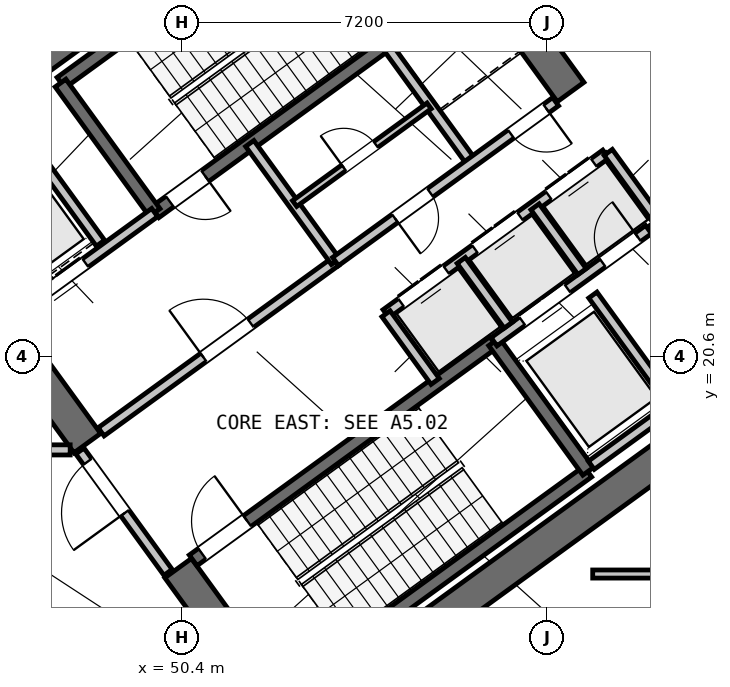
"""IFC4 building model, lengths in metres.
Left out: names, types, materials, properties, quantities, classifications, styles, units other than length and angle.
Written with IfcOpenShell. Run it as: python <this file> out.ifc"""

import sys

from ifc_helpers import new_model, si_unit, direction, frame, frame_2d, origin, place, context, subcontext, project, spatial, rectangle, extrude, source, transform, mapped, element, fill, save


model = new_model("IFC4")
c1 = context("Model", 3, precision=1e-05, world=origin(), true_north=direction((0.0, 1.0)))
c2 = subcontext(c1, "Body", "Model", "MODEL_VIEW")
j1 = project(units=[si_unit("LENGTHUNIT", "METRE"), si_unit("PLANEANGLEUNIT", "RADIAN")], contexts=[c1])
p1 = place(None, origin())
s1 = spatial("IfcSite", under=j1, at=p1, CompositionType="ELEMENT")
p2 = place(p1, origin())
s2 = spatial("IfcBuilding", under=s1, at=p2, CompositionType="ELEMENT")
p3 = place(p2, origin())
s3 = spatial("IfcBuildingStorey", under=s2, at=p3, CompositionType="ELEMENT", Elevation=0.0)
p4 = place(p3, frame((52.318, 13.11, 0.0), z_axis=(0.0, 0.0, 1.0), x_axis=(0.809019445368, 0.587781878776, 0.0)))
e1 = element("IfcWall", 1, at=p4, inside=s3, PredefinedType="SHEAR", context=c2, shape_type="SweptSolid", body=[
    extrude(rectangle(XDim=12.44, YDim=0.65, at=frame_2d((6.22, 0.0))), origin(), (0.0, 0.0, 1.0), 5.05),
])
p5 = place(p3, frame((44.325, 24.113, 0.0), z_axis=(0.0, 0.0, 1.0), x_axis=(0.809012664862, 0.58779121131, 0.0)))
e2 = element("IfcWall", 2, at=p5, inside=s3, PredefinedType="SHEAR", context=c2, shape_type="SweptSolid", body=[
    extrude(rectangle(XDim=12.44, YDim=0.65, at=frame_2d((6.22, 0.0))), origin(), (0.0, 0.0, 1.0), 5.05),
])
p6 = place(p3, frame((52.39, 13.564, 0.0), z_axis=(0.0, 0.0, 1.0), x_axis=(-0.58779688989, 0.809008539037, 0.0)))
e3 = element("IfcWall", 3, at=p6, inside=s3, PredefinedType="SHEAR", context=c2, shape_type="SweptSolid", body=[
    extrude(rectangle(XDim=3.525, YDim=0.65, at=frame_2d((1.763, 0.0))), origin(), (0.0, 0.0, 1.0), 5.05),
])
p7 = place(p3, frame((48.526, 18.884, 0.0), z_axis=(0.0, 0.0, 1.0), x_axis=(-0.58777996584, 0.809020835181, 0.0)))
e4 = element("IfcWall", 4, at=p7, inside=s3, PredefinedType="SHEAR", context=c2, shape_type="SweptSolid", body=[
    extrude(rectangle(XDim=6.375, YDim=0.65, at=frame_2d((3.188, 0.0))), origin(), (0.0, 0.0, 1.0), 5.05),
])
p8 = place(p3, frame((61.929, 20.494, 0.0), z_axis=(0.0, 0.0, 1.0), x_axis=(-0.58782982593, 0.808984607855, 0.0)))
e5 = element("IfcWall", 5, at=p8, inside=s3, PredefinedType="SHEAR", context=c2, shape_type="SweptSolid", body=[
    extrude(rectangle(XDim=3.525, YDim=0.65, at=frame_2d((1.762, 0.0))), origin(), (0.0, 0.0, 1.0), 5.05),
])
p9 = place(p3, frame((58.064, 25.813, 0.0), z_axis=(0.0, 0.0, 1.0), x_axis=(-0.58777996584, 0.809020835181, 0.0)))
e6 = element("IfcWall", 6, at=p9, inside=s3, PredefinedType="SHEAR", context=c2, shape_type="SweptSolid", body=[
    extrude(rectangle(XDim=6.375, YDim=0.65, at=frame_2d((3.188, 0.0))), origin(), (0.0, 0.0, 1.0), 5.05),
])
p10 = place(p3, frame((48.006, 25.996, 0.0), z_axis=(0.0, 0.0, 1.0), x_axis=(0.80901903764, 0.587782439969, 0.0)))
e7 = element("IfcWall", 7, at=p10, inside=s3, PredefinedType="SHEAR", context=c2, shape_type="SweptSolid", body=[
    extrude(rectangle(XDim=7.46, YDim=0.26, at=frame_2d((3.73, 0.0))), origin(), (0.0, 0.0, 1.0), 5.05),
])
p11 = place(p3, frame((49.863, 23.44, 0.0), z_axis=(0.0, 0.0, 1.0), x_axis=(0.809003474932, 0.587803859759, 0.0)))
e8 = element("IfcWall", 8, at=p11, inside=s3, PredefinedType="SHEAR", context=c2, shape_type="SweptSolid", body=[
    extrude(rectangle(XDim=7.46, YDim=0.26, at=frame_2d((3.73, 0.0))), origin(), (0.0, 0.0, 1.0), 5.05),
])
p12 = place(p11, frame((0.36, 0.0, 0.0)))
e9 = element("IfcOpeningElement", 9, at=p12, cuts=e8, PredefinedType="OPENING", context=c2, shape_type="SweptSolid", body=[
    extrude(rectangle(XDim=0.86, YDim=2.05, at=frame_2d((0.43, 1.025))), frame((0.0, 0.14, 0.0), z_axis=(0.0, -1.0, 0.0), x_axis=(1.0, 0.0, 0.0)), (0.0, 0.0, 1.0), 0.28),
])
p13 = place(p3, frame((49.855, 23.434, 0.0), z_axis=(0.0, 0.0, 1.0), x_axis=(-0.58776738483, 0.809029975545, 0.0)))
e10 = element("IfcWall", 10, at=p13, inside=s3, PredefinedType="SHEAR", context=c2, shape_type="SweptSolid", body=[
    extrude(rectangle(XDim=3.16, YDim=0.26, at=frame_2d((1.58, 0.0))), origin(), (0.0, 0.0, 1.0), 5.05),
])
p14 = place(p3, frame((52.472, 14.013, 0.0), z_axis=(0.0, 0.0, 1.0), x_axis=(0.809028366311, 0.587769599847, 0.0)))
e11 = element("IfcWall", 11, at=p14, inside=s3, PredefinedType="SHEAR", context=c2, shape_type="SweptSolid", body=[
    extrude(rectangle(XDim=7.33, YDim=0.26, at=frame_2d((3.665, 0.0))), origin(), (0.0, 0.0, 1.0), 5.05),
])
p15 = place(p3, frame((50.615, 16.57, 0.0), z_axis=(0.0, 0.0, 1.0), x_axis=(0.809028366311, 0.587769599847, 0.0)))
e12 = element("IfcWall", 12, at=p15, inside=s3, PredefinedType="SHEAR", context=c2, shape_type="SweptSolid", body=[
    extrude(rectangle(XDim=7.33, YDim=0.26, at=frame_2d((3.665, 0.0))), origin(), (0.0, 0.0, 1.0), 5.05),
])
p16 = place(p15, frame((0.22, 0.0, 0.0)))
e13 = element("IfcOpeningElement", 13, at=p16, cuts=e12, PredefinedType="OPENING", context=c2, shape_type="SweptSolid", body=[
    extrude(rectangle(XDim=1.1, YDim=2.1, at=frame_2d((0.55, 1.05))), frame((0.0, 0.14, 0.0), z_axis=(0.0, -1.0, 0.0), x_axis=(1.0, 0.0, 0.0)), (0.0, 0.0, 1.0), 0.28),
])
p17 = place(p3, frame((58.41, 18.327, 0.0), z_axis=(0.0, 0.0, 1.0), x_axis=(-0.58776738483, 0.809029975545, 0.0)))
e14 = element("IfcWall", 14, at=p17, inside=s3, PredefinedType="SHEAR", context=c2, shape_type="SweptSolid", body=[
    extrude(rectangle(XDim=3.16, YDim=0.26, at=frame_2d((1.58, 0.0))), origin(), (0.0, 0.0, 1.0), 5.05),
])
p18 = place(p3, frame((47.106, 21.437, 0.0), z_axis=(0.0, 0.0, 1.0), x_axis=(0.809012514015, 0.58779141893, 0.0)))
e15 = element("IfcWall", 15, at=p18, inside=s3, PredefinedType="STANDARD", context=c2, shape_type="SweptSolid", body=[
    extrude(rectangle(XDim=3.398, YDim=0.2, at=frame_2d((1.699, 0.0))), origin(), (0.0, 0.0, 1.0), 5.04),
])
p19 = place(p18, frame((0.408, 0.0, 0.0)))
e16 = element("IfcOpeningElement", 16, at=p19, cuts=e15, PredefinedType="OPENING", context=c2, shape_type="SweptSolid", body=[
    extrude(rectangle(XDim=1.3, YDim=2.2, at=frame_2d((0.65, 1.1))), frame((0.0, 0.11, 0.0), z_axis=(0.0, -1.0, 0.0), x_axis=(1.0, 0.0, 0.0)), (0.0, 0.0, 1.0), 0.22),
])
p20 = place(p3, frame((48.799, 19.107, 0.0), z_axis=(0.0, 0.0, 1.0), x_axis=(0.809012959416, 0.587790805897, 0.0)))
e17 = element("IfcWall", 17, at=p20, inside=s3, PredefinedType="STANDARD", context=c2, shape_type="SweptSolid", body=[
    extrude(rectangle(XDim=5.718, YDim=0.2, at=frame_2d((2.859, 0.0))), origin(), (0.0, 0.0, 1.0), 5.04),
])
p21 = place(p20, frame((2.498, 0.0, 0.0)))
e18 = element("IfcOpeningElement", 18, at=p21, cuts=e17, PredefinedType="OPENING", context=c2, shape_type="SweptSolid", body=[
    extrude(rectangle(XDim=1.15, YDim=2.1, at=frame_2d((0.575, 1.05))), frame((0.0, 0.11, 0.0), z_axis=(0.0, -1.0, 0.0), x_axis=(1.0, 0.0, 0.0)), (0.0, 0.0, 1.0), 0.22),
])
p22 = place(p3, frame((56.553, 20.884, 0.0), z_axis=(0.0, 0.0, 1.0), x_axis=(0.809035789462, 0.587759382205, 0.0)))
e19 = element("IfcWall", 19, at=p22, inside=s3, PredefinedType="STANDARD", context=c2, shape_type="SweptSolid", body=[
    extrude(rectangle(XDim=3.768, YDim=0.2, at=frame_2d((1.884, 0.0))), origin(), (0.0, 0.0, 1.0), 5.04),
])
p23 = place(p22, frame((0.69, 0.0, 0.0)))
e20 = element("IfcOpeningElement", 20, at=p23, cuts=e19, PredefinedType="OPENING", context=c2, shape_type="SweptSolid", body=[
    extrude(rectangle(XDim=1.1, YDim=2.15, at=frame_2d((0.55, 1.075))), frame((0.0, 0.11, 0.0), z_axis=(0.0, -1.0, 0.0), x_axis=(1.0, 0.0, 0.0)), (0.0, 0.0, 1.0), 0.22),
])
p24 = place(p22, frame((2.65, 0.0, 0.0)))
e21 = element("IfcOpeningElement", 21, at=p24, cuts=e19, PredefinedType="OPENING", context=c2, shape_type="SweptSolid", body=[
    extrude(rectangle(XDim=0.86, YDim=2.05, at=frame_2d((0.43, 1.025))), frame((0.0, 0.11, 0.0), z_axis=(0.0, -1.0, 0.0), x_axis=(1.0, 0.0, 0.0)), (0.0, 0.0, 1.0), 0.22),
])
p25 = place(p3, frame((54.421, 21.436, 0.0), z_axis=(0.0, 0.0, 1.0), x_axis=(0.809013710463, 0.587789772183, 0.0)))
e22 = element("IfcWall", 22, at=p25, inside=s3, PredefinedType="STANDARD", context=c2, shape_type="SweptSolid", body=[
    extrude(rectangle(XDim=5.36, YDim=0.2, at=frame_2d((2.68, 0.0))), origin(), (0.0, 0.0, 1.0), 5.04),
])
p26 = place(p25, frame((0.37, 0.0, 0.0)))
e23 = element("IfcOpeningElement", 23, at=p26, cuts=e22, PredefinedType="OPENING", context=c2, shape_type="SweptSolid", body=[
    extrude(rectangle(XDim=1.1, YDim=2.15, at=frame_2d((0.55, 1.075))), frame((0.0, 0.11, 0.0), z_axis=(0.0, -1.0, 0.0), x_axis=(1.0, 0.0, 0.0)), (0.0, 0.0, 1.0), 0.22),
])
p27 = place(p25, frame((2.17, 0.0, 0.0)))
e24 = element("IfcOpeningElement", 24, at=p27, cuts=e22, PredefinedType="OPENING", context=c2, shape_type="SweptSolid", body=[
    extrude(rectangle(XDim=1.1, YDim=2.15, at=frame_2d((0.55, 1.075))), frame((0.0, 0.11, 0.0), z_axis=(0.0, -1.0, 0.0), x_axis=(1.0, 0.0, 0.0)), (0.0, 0.0, 1.0), 0.22),
])
p28 = place(p25, frame((3.97, 0.0, 0.0)))
e25 = element("IfcOpeningElement", 25, at=p28, cuts=e22, PredefinedType="OPENING", context=c2, shape_type="SweptSolid", body=[
    extrude(rectangle(XDim=1.1, YDim=2.15, at=frame_2d((0.55, 1.075))), frame((0.0, 0.11, 0.0), z_axis=(0.0, -1.0, 0.0), x_axis=(1.0, 0.0, 0.0)), (0.0, 0.0, 1.0), 0.22),
])
p29 = place(p3, frame((55.391, 20.102, 0.0), z_axis=(0.0, 0.0, 1.0), x_axis=(-0.58778447739, 0.809017557374, 0.0)))
e26 = element("IfcWall", 26, at=p29, inside=s3, PredefinedType="STANDARD", context=c2, shape_type="SweptSolid", body=[
    extrude(rectangle(XDim=1.65, YDim=0.2, at=frame_2d((0.825, 0.0))), origin(), (0.0, 0.0, 1.0), 5.04),
])
p30 = place(p3, frame((48.786, 22.83, 0.0), z_axis=(0.0, 0.0, 1.0), x_axis=(-0.587783856777, 0.809018008275, 0.0)))
e27 = element("IfcWall", 27, at=p30, inside=s3, PredefinedType="STANDARD", context=c2, shape_type="SweptSolid", body=[
    extrude(rectangle(XDim=2.92, YDim=0.2, at=frame_2d((1.46, 0.0))), origin(), (0.0, 0.0, 1.0), 5.04),
])
p31 = place(p3, frame((56.834, 21.212, 0.0), z_axis=(0.0, 0.0, 1.0), x_axis=(-0.58776738483, 0.809029975545, 0.0)))
e28 = element("IfcWall", 28, at=p31, inside=s3, PredefinedType="STANDARD", context=c2, shape_type="SweptSolid", body=[
    extrude(rectangle(XDim=1.58, YDim=0.2, at=frame_2d((0.79, 0.0))), origin(), (0.0, 0.0, 1.0), 5.04),
])
p32 = place(p3, frame((58.29, 22.27, 0.0), z_axis=(0.0, 0.0, 1.0), x_axis=(-0.587840865826, 0.808976585857, 0.0)))
e29 = element("IfcWall", 29, at=p32, inside=s3, PredefinedType="STANDARD", context=c2, shape_type="SweptSolid", body=[
    extrude(rectangle(XDim=1.58, YDim=0.2, at=frame_2d((0.79, 0.0))), origin(), (0.0, 0.0, 1.0), 5.04),
])
p33 = place(p3, frame((59.758, 23.312, 0.0), z_axis=(0.0, 0.0, 1.0), x_axis=(-0.587875962906, 0.808951081486, 0.0)))
e30 = element("IfcWall", 30, at=p33, inside=s3, PredefinedType="STANDARD", context=c2, shape_type="SweptSolid", body=[
    extrude(rectangle(XDim=1.62, YDim=0.2, at=frame_2d((0.81, 0.0))), origin(), (0.0, 0.0, 1.0), 5.04),
])
p34 = place(p3, frame((60.067, 19.655, 0.0), z_axis=(0.0, 0.0, 1.0), x_axis=(-0.587800520745, 0.809005900975, 0.0)))
e31 = element("IfcWall", 31, at=p34, inside=s3, PredefinedType="STANDARD", context=c2, shape_type="SweptSolid", body=[
    extrude(rectangle(XDim=2.66, YDim=0.2, at=frame_2d((1.33, 0.0))), origin(), (0.0, 0.0, 1.0), 5.04),
])
p35 = place(p3, frame((58.472, 18.447, 0.0), z_axis=(0.0, 0.0, 1.0), x_axis=(0.809022487728, 0.587777691266, 0.0)))
e32 = element("IfcWall", 32, at=p35, inside=s3, PredefinedType="STANDARD", context=c2, shape_type="SweptSolid", body=[
    extrude(rectangle(XDim=3.648, YDim=0.2, at=frame_2d((1.824, 0.0))), origin(), (0.0, 0.0, 1.0), 5.04),
])
p36 = place(p3, frame((53.425, 22.468, 0.0), z_axis=(0.0, 0.0, 1.0), x_axis=(-0.5877230039, 0.809062216821, 0.0)))
e33 = element("IfcWall", 33, at=p36, inside=s3, PredefinedType="STANDARD", context=c2, shape_type="SweptSolid", body=[
    extrude(rectangle(XDim=2.88, YDim=0.2, at=frame_2d((1.44, 0.0))), origin(), (0.0, 0.0, 1.0), 5.04),
])
p37 = place(p3, frame((56.111, 24.419, 0.0), z_axis=(0.0, 0.0, 1.0), x_axis=(-0.58777848983, 0.809021907548, 0.0)))
e34 = element("IfcWall", 34, at=p37, inside=s3, PredefinedType="STANDARD", context=c2, shape_type="SweptSolid", body=[
    extrude(rectangle(XDim=2.88, YDim=0.2, at=frame_2d((1.44, 0.0))), origin(), (0.0, 0.0, 1.0), 5.04),
])
p38 = place(p3, frame((53.425, 22.468, 0.0), z_axis=(0.0, 0.0, 1.0), x_axis=(0.80902705128, 0.587771409902, 0.0)))
e35 = element("IfcWall", 35, at=p38, inside=s3, PredefinedType="STANDARD", context=c2, shape_type="SweptSolid", body=[
    extrude(rectangle(XDim=5.368, YDim=0.2, at=frame_2d((2.684, 0.0))), origin(), (0.0, 0.0, 1.0), 5.04),
])
p39 = place(p38, frame((4.28, 0.0, 0.0)))
e36 = element("IfcOpeningElement", 36, at=p39, cuts=e35, PredefinedType="OPENING", context=c2, shape_type="SweptSolid", body=[
    extrude(rectangle(XDim=0.86, YDim=2.05, at=frame_2d((0.43, 1.025))), frame((0.0, 0.11, 0.0), z_axis=(0.0, -1.0, 0.0), x_axis=(1.0, 0.0, 0.0)), (0.0, 0.0, 1.0), 0.22),
])
p40 = place(p38, frame((1.45, 0.0, 0.0)))
e37 = element("IfcOpeningElement", 37, at=p40, cuts=e35, PredefinedType="OPENING", context=c2, shape_type="SweptSolid", body=[
    extrude(rectangle(XDim=0.86, YDim=2.05, at=frame_2d((0.43, 1.025))), frame((0.0, 0.11, 0.0), z_axis=(0.0, -1.0, 0.0), x_axis=(1.0, 0.0, 0.0)), (0.0, 0.0, 1.0), 0.22),
])
p41 = place(p3, frame((52.618, 23.612, 0.0), z_axis=(0.0, 0.0, 1.0), x_axis=(0.809009587469, 0.587795446889, 0.0)))
e38 = element("IfcWall", 38, at=p41, inside=s3, PredefinedType="PLUMBINGWALL", context=c2, shape_type="SweptSolid", body=[
    extrude(rectangle(XDim=3.28, YDim=0.14, at=frame_2d((1.64, 0.0))), origin(), (0.0, 0.0, 1.0), 5.04),
])
p42 = place(p41, frame((1.2, 0.0, 0.0)))
e39 = element("IfcOpeningElement", 39, at=p42, cuts=e38, PredefinedType="OPENING", context=c2, shape_type="SweptSolid", body=[
    extrude(rectangle(XDim=0.78, YDim=2.05, at=frame_2d((0.39, 1.025))), frame((0.0, 0.08, 0.0), z_axis=(0.0, -1.0, 0.0), x_axis=(1.0, 0.0, 0.0)), (0.0, 0.0, 1.0), 0.16),
])
p43 = place(p3, frame((46.85, 18.75, 0.0), z_axis=(0.0, 0.0, 1.0), x_axis=(1.0, 0.0, 0.0)))
e40 = element("IfcWall", 40, at=p43, inside=s3, PredefinedType="STANDARD", context=c2, shape_type="SweptSolid", body=[
    extrude(rectangle(XDim=1.338, YDim=0.2, at=frame_2d((0.669, 0.0))), origin(), (0.0, 0.0, 1.0), 5.04),
])
p44 = place(p3, frame((50.119, 16.333, 0.0), z_axis=(0.0, 0.0, 1.0), x_axis=(-0.587749856981, 0.809042709391, 0.0)))
e41 = element("IfcWall", 41, at=p44, inside=s3, PredefinedType="STANDARD", context=c2, shape_type="SweptSolid", body=[
    extrude(rectangle(XDim=2.96, YDim=0.2, at=frame_2d((1.48, 0.0))), origin(), (0.0, 0.0, 1.0), 5.04),
])
p45 = place(p44, frame((1.45, 0.0, 0.0)))
e42 = element("IfcOpeningElement", 42, at=p45, cuts=e41, PredefinedType="OPENING", context=c2, shape_type="SweptSolid", body=[
    extrude(rectangle(XDim=1.25, YDim=2.15, at=frame_2d((0.625, 1.075))), frame((0.0, 0.11, 0.0), z_axis=(0.0, -1.0, 0.0), x_axis=(1.0, 0.0, 0.0)), (0.0, 0.0, 1.0), 0.22),
])
p46 = place(p3, frame((58.5, 16.3, 0.0), z_axis=(0.0, 0.0, 1.0), x_axis=(1.0, 0.0, 0.0)))
e43 = element("IfcWall", 43, at=p46, inside=s3, PredefinedType="PARTITIONING", context=c2, shape_type="SweptSolid", body=[
    extrude(rectangle(XDim=11.9, YDim=0.16, at=frame_2d((5.95, 0.0))), origin(), (0.0, 0.0, 1.0), 5.04),
])
p47 = place(p46, frame((1.4, 0.0, 0.0)))
e44 = element("IfcOpeningElement", 44, at=p47, cuts=e43, PredefinedType="OPENING", context=c2, shape_type="SweptSolid", body=[
    extrude(rectangle(XDim=1.7, YDim=2.2, at=frame_2d((0.85, 1.1))), frame((0.0, 0.09, 0.0), z_axis=(0.0, -1.0, 0.0), x_axis=(1.0, 0.0, 0.0)), (0.0, 0.0, 1.0), 0.18),
])
m1 = source(origin(), c2, "Body", "SweptSolid", [
    extrude(rectangle(XDim=0.86, YDim=2.05, at=frame_2d((0.43, 1.025))), frame((0.0, 0.025, 0.0), z_axis=(0.0, -1.0, 0.0), x_axis=(1.0, 0.0, 0.0)), (0.0, 0.0, 1.0), 0.05),
])
p48 = place(p12, frame((0.86, 0.0, 0.0), z_axis=(0.0, 0.0, 1.0), x_axis=(-1.0, 0.0, 0.0)))
e45 = element("IfcDoor", 45, at=p48, inside=s3, OperationType="SINGLE_SWING_LEFT", PredefinedType="DOOR", context=c2, shape_type="MappedRepresentation", body=[
    mapped(m1, transform((0.0, 0.0, 0.0), scale=1.0)),
])
fill(e9, e45)
m2 = source(origin(), c2, "Body", "SweptSolid", [
    extrude(rectangle(XDim=1.1, YDim=2.1, at=frame_2d((0.55, 1.05))), frame((0.0, 0.025, 0.0), z_axis=(0.0, -1.0, 0.0), x_axis=(1.0, 0.0, 0.0)), (0.0, 0.0, 1.0), 0.05),
])
p49 = place(p16, origin())
e46 = element("IfcDoor", 46, at=p49, inside=s3, OperationType="SINGLE_SWING_RIGHT", PredefinedType="DOOR", context=c2, shape_type="MappedRepresentation", body=[
    mapped(m2, transform((0.0, 0.0, 0.0), scale=1.0)),
])
fill(e13, e46)
m3 = source(origin(), c2, "Body", "SweptSolid", [
    extrude(rectangle(XDim=1.15, YDim=2.1, at=frame_2d((0.575, 1.05))), frame((0.0, 0.025, 0.0), z_axis=(0.0, -1.0, 0.0), x_axis=(1.0, 0.0, 0.0)), (0.0, 0.0, 1.0), 0.05),
])
p50 = place(p21, origin())
e47 = element("IfcDoor", 47, at=p50, inside=s3, OperationType="SINGLE_SWING_LEFT", PredefinedType="DOOR", context=c2, shape_type="MappedRepresentation", body=[
    mapped(m3, transform((0.0, 0.0, 0.0), scale=1.0)),
])
fill(e18, e47)
m4 = source(origin(), c2, "Body", "SweptSolid", [
    extrude(rectangle(XDim=1.3, YDim=2.2, at=frame_2d((0.65, 1.1))), frame((0.0, 0.025, 0.0), z_axis=(0.0, -1.0, 0.0), x_axis=(1.0, 0.0, 0.0)), (0.0, 0.0, 1.0), 0.05),
])
p51 = place(p19, origin())
e48 = element("IfcDoor", 48, at=p51, inside=s3, OperationType="DOUBLE_DOOR_SLIDING", PredefinedType="DOOR", context=c2, shape_type="MappedRepresentation", body=[
    mapped(m4, transform((0.0, 0.0, 0.0), scale=1.0)),
])
fill(e16, e48)
m5 = source(origin(), c2, "Body", "SweptSolid", [
    extrude(rectangle(XDim=1.1, YDim=2.15, at=frame_2d((0.55, 1.075))), frame((0.0, 0.025, 0.0), z_axis=(0.0, -1.0, 0.0), x_axis=(1.0, 0.0, 0.0)), (0.0, 0.0, 1.0), 0.05),
])
p52 = place(p26, origin())
e49 = element("IfcDoor", 49, at=p52, inside=s3, OperationType="DOUBLE_DOOR_SLIDING", PredefinedType="DOOR", context=c2, shape_type="MappedRepresentation", body=[
    mapped(m5, transform((0.0, 0.0, 0.0), scale=1.0)),
])
fill(e23, e49)
p53 = place(p27, origin())
e50 = element("IfcDoor", 50, at=p53, inside=s3, OperationType="DOUBLE_DOOR_SLIDING", PredefinedType="DOOR", context=c2, shape_type="MappedRepresentation", body=[
    mapped(m5, transform((0.0, 0.0, 0.0), scale=1.0)),
])
fill(e24, e50)
p54 = place(p28, origin())
e51 = element("IfcDoor", 51, at=p54, inside=s3, OperationType="DOUBLE_DOOR_SLIDING", PredefinedType="DOOR", context=c2, shape_type="MappedRepresentation", body=[
    mapped(m5, transform((0.0, 0.0, 0.0), scale=1.0)),
])
fill(e25, e51)
p55 = place(p23, origin())
e52 = element("IfcDoor", 52, at=p55, inside=s3, OperationType="DOUBLE_DOOR_SLIDING", PredefinedType="DOOR", context=c2, shape_type="MappedRepresentation", body=[
    mapped(m5, transform((0.0, 0.0, 0.0), scale=1.0)),
])
fill(e20, e52)
p56 = place(p24, origin())
e53 = element("IfcDoor", 53, at=p56, inside=s3, OperationType="SINGLE_SWING_RIGHT", PredefinedType="DOOR", context=c2, shape_type="MappedRepresentation", body=[
    mapped(m1, transform((0.0, 0.0, 0.0), scale=1.0)),
])
fill(e21, e53)
p57 = place(p39, frame((0.86, 0.0, 0.0), z_axis=(0.0, 0.0, 1.0), x_axis=(-1.0, 0.0, 0.0)))
e54 = element("IfcDoor", 54, at=p57, inside=s3, OperationType="SINGLE_SWING_LEFT", PredefinedType="DOOR", context=c2, shape_type="MappedRepresentation", body=[
    mapped(m1, transform((0.0, 0.0, 0.0), scale=1.0)),
])
fill(e36, e54)
p58 = place(p40, frame((0.86, 0.0, 0.0), z_axis=(0.0, 0.0, 1.0), x_axis=(-1.0, 0.0, 0.0)))
e55 = element("IfcDoor", 55, at=p58, inside=s3, OperationType="SINGLE_SWING_RIGHT", PredefinedType="DOOR", context=c2, shape_type="MappedRepresentation", body=[
    mapped(m1, transform((0.0, 0.0, 0.0), scale=1.0)),
])
fill(e37, e55)
m6 = source(origin(), c2, "Body", "SweptSolid", [
    extrude(rectangle(XDim=0.78, YDim=2.05, at=frame_2d((0.39, 1.025))), frame((0.0, 0.025, 0.0), z_axis=(0.0, -1.0, 0.0), x_axis=(1.0, 0.0, 0.0)), (0.0, 0.0, 1.0), 0.05),
])
p59 = place(p42, origin())
e56 = element("IfcDoor", 56, at=p59, inside=s3, OperationType="SINGLE_SWING_LEFT", PredefinedType="DOOR", context=c2, shape_type="MappedRepresentation", body=[
    mapped(m6, transform((0.0, 0.0, 0.0), scale=1.0)),
])
fill(e39, e56)
m7 = source(origin(), c2, "Body", "SweptSolid", [
    extrude(rectangle(XDim=1.25, YDim=2.15, at=frame_2d((0.625, 1.075))), frame((0.0, 0.025, 0.0), z_axis=(0.0, -1.0, 0.0), x_axis=(1.0, 0.0, 0.0)), (0.0, 0.0, 1.0), 0.05),
])
p60 = place(p45, origin())
e57 = element("IfcDoor", 57, at=p60, inside=s3, OperationType="SINGLE_SWING_LEFT", PredefinedType="DOOR", context=c2, shape_type="MappedRepresentation", body=[
    mapped(m7, transform((0.0, 0.0, 0.0), scale=1.0)),
])
fill(e42, e57)
save(model, sys.argv[1])
